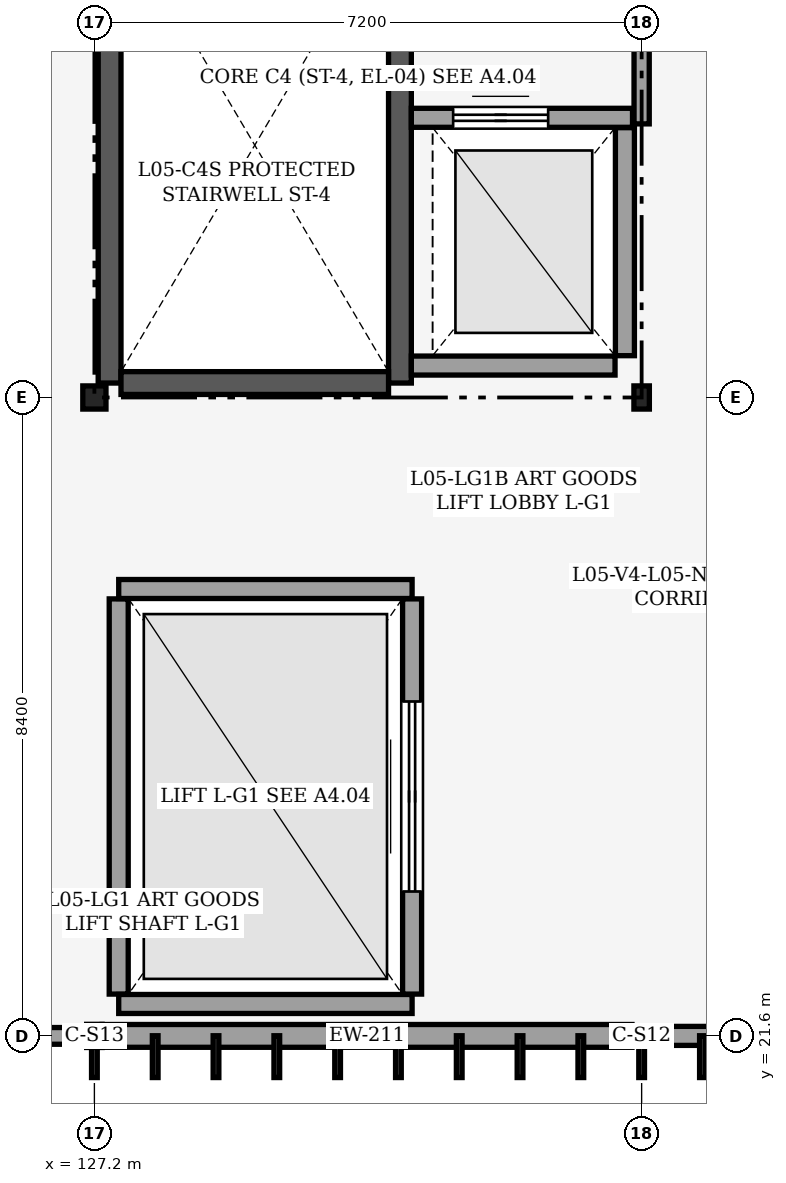
"""IFC4 building model, lengths in metres.
Left out: names, types, materials, properties, quantities, classifications, styles, units other than length and angle.
Written with IfcOpenShell. Run it as: python <this file> out.ifc"""

import sys

from ifc_helpers import new_model, si_unit, direction, frame, frame_2d, origin, origin_2d, place, context, subcontext, project, spatial, rectangle, hollow_rectangle, extrude, element, fill, save


model = new_model("IFC4")
c1 = context("Model", 3, precision=1e-05, world=origin(), true_north=direction((0.0, 1.0)))
c2 = subcontext(c1, "Body", "Model", "MODEL_VIEW")
j1 = project(units=[si_unit("LENGTHUNIT", "METRE"), si_unit("PLANEANGLEUNIT", "RADIAN")], contexts=[c1])
p1 = place(None, origin())
s1 = spatial("IfcSite", under=j1, at=p1, CompositionType="ELEMENT")
p2 = place(p1, origin())
s2 = spatial("IfcBuilding", under=s1, at=p2, CompositionType="ELEMENT")
p3 = place(p2, frame((0.0, 0.0, 24.6)))
s3 = spatial("IfcBuildingStorey", under=s2, at=p3, CompositionType="ELEMENT", Elevation=24.6)
p4 = place(p3, frame((127.2, 21.6, 0.0), z_axis=(0.0, 0.0, 1.0), x_axis=(1.0, 0.0, 0.0)))
e1 = element("IfcColumn", 1, at=p4, inside=s3, PredefinedType="COLUMN", context=c2, shape_type="SweptSolid", body=[
    extrude(hollow_rectangle(XDim=0.203, YDim=0.305, WallThickness=0.013, OuterFilletRadius=0.025, at=origin_2d()), origin(), (0.0, 0.0, 1.0), 4.8),
])
p5 = place(p3, frame((127.2, 30.0, 0.0), z_axis=(0.0, 0.0, 1.0), x_axis=(1.0, 0.0, 0.0)))
e2 = element("IfcColumn", 2, at=p5, inside=s3, PredefinedType="COLUMN", context=c2, shape_type="SweptSolid", body=[
    extrude(hollow_rectangle(XDim=0.305, YDim=0.305, WallThickness=0.016, OuterFilletRadius=0.032, at=origin_2d()), origin(), (0.0, 0.0, 1.0), 4.8),
])
p6 = place(p3, frame((134.4, 21.6, 0.0), z_axis=(0.0, 0.0, 1.0), x_axis=(1.0, 0.0, 0.0)))
e3 = element("IfcColumn", 3, at=p6, inside=s3, PredefinedType="COLUMN", context=c2, shape_type="SweptSolid", body=[
    extrude(hollow_rectangle(XDim=0.254, YDim=0.254, WallThickness=0.013, OuterFilletRadius=0.025, at=origin_2d()), origin(), (0.0, 0.0, 1.0), 4.8),
])
p7 = place(p3, frame((134.4, 30.0, 0.0), z_axis=(0.0, 0.0, 1.0), x_axis=(1.0, 0.0, 0.0)))
e4 = element("IfcColumn", 4, at=p7, inside=s3, PredefinedType="COLUMN", context=c2, shape_type="SweptSolid", body=[
    extrude(hollow_rectangle(XDim=0.203, YDim=0.305, WallThickness=0.013, OuterFilletRadius=0.025, at=origin_2d()), origin(), (0.0, 0.0, 1.0), 4.8),
])
p8 = place(p3, frame((127.098, 21.6, 0.0), z_axis=(0.0, 0.0, 1.0), x_axis=(-1.0, 0.0, 0.0)))
e5 = element("IfcWall", 5, at=p8, inside=s3, PredefinedType="SOLIDWALL", context=c2, shape_type="SweptSolid", body=[
    extrude(rectangle(XDim=6.946, YDim=0.22, at=frame_2d((3.473, 0.0))), origin(), (0.0, 0.0, 1.0), 3.695),
])
p9 = place(p8, frame((2.423, 0.0, 0.9)))
e6 = element("IfcOpeningElement", 6, at=p9, cuts=e5, PredefinedType="OPENING", context=c2, shape_type="SweptSolid", body=[
    extrude(rectangle(XDim=2.1, YDim=0.9, at=frame_2d((1.05, 0.45))), frame((0.0, 0.12, 0.0), z_axis=(0.0, -1.0, 0.0), x_axis=(1.0, 0.0, 0.0)), (0.0, 0.0, 1.0), 0.24),
])
p10 = place(p3, frame((134.273, 21.6, 0.0), z_axis=(0.0, 0.0, 1.0), x_axis=(-1.0, 0.0, 0.0)))
e7 = element("IfcWall", 7, at=p10, inside=s3, PredefinedType="SOLIDWALL", context=c2, shape_type="SweptSolid", body=[
    extrude(rectangle(XDim=6.971, YDim=0.3, at=frame_2d((3.486, 0.0))), origin(), (0.0, 0.0, 1.0), 3.695),
])
p11 = place(p3, frame((141.498, 21.6, 0.0), z_axis=(0.0, 0.0, 1.0), x_axis=(-1.0, 0.0, 0.0)))
e8 = element("IfcWall", 8, at=p11, inside=s3, PredefinedType="SOLIDWALL", context=c2, shape_type="SweptSolid", body=[
    extrude(rectangle(XDim=6.971, YDim=0.25, at=frame_2d((3.486, 0.0))), origin(), (0.0, 0.0, 1.0), 3.695),
])
p12 = place(p11, frame((2.286, 0.0, 0.9)))
e9 = element("IfcOpeningElement", 9, at=p12, cuts=e8, PredefinedType="OPENING", context=c2, shape_type="SweptSolid", body=[
    extrude(rectangle(XDim=2.4, YDim=0.9, at=frame_2d((1.2, 0.45))), frame((0.0, 0.135, 0.0), z_axis=(0.0, -1.0, 0.0), x_axis=(1.0, 0.0, 0.0)), (0.0, 0.0, 1.0), 0.271),
])
p13 = place(p3, frame((127.4, 30.19, 0.0), z_axis=(0.0, 0.0, 1.0), x_axis=(0.0, 1.0, 0.0)))
e10 = element("IfcWall", 10, at=p13, inside=s3, PredefinedType="SHEAR", context=c2, shape_type="SweptSolid", body=[
    extrude(rectangle(XDim=8.02, YDim=0.3, at=frame_2d((4.01, 0.0))), origin(), (0.0, 0.0, 1.0), 4.6),
])
p14 = place(p3, frame((131.22, 30.19, 0.0), z_axis=(0.0, 0.0, 1.0), x_axis=(0.0, 1.0, 0.0)))
e11 = element("IfcWall", 11, at=p14, inside=s3, PredefinedType="SHEAR", context=c2, shape_type="SweptSolid", body=[
    extrude(rectangle(XDim=8.02, YDim=0.3, at=frame_2d((4.01, 0.0))), origin(), (0.0, 0.0, 1.0), 4.6),
])
p15 = place(p14, frame((6.47, 0.0, 0.0)))
e12 = element("IfcOpeningElement", 12, at=p15, cuts=e11, PredefinedType="OPENING", context=c2, shape_type="SweptSolid", body=[
    extrude(rectangle(XDim=1.1, YDim=2.15, at=frame_2d((0.55, 1.075))), frame((0.0, 0.16, 0.0), z_axis=(0.0, -1.0, 0.0), x_axis=(1.0, 0.0, 0.0)), (0.0, 0.0, 1.0), 0.321),
])
p16 = place(p3, frame((127.55, 30.19, 0.0), z_axis=(0.0, 0.0, 1.0), x_axis=(1.0, 0.0, 0.0)))
e13 = element("IfcWall", 13, at=p16, inside=s3, PredefinedType="SHEAR", context=c2, shape_type="SweptSolid", body=[
    extrude(rectangle(XDim=3.52, YDim=0.3, at=frame_2d((1.76, 0.0))), origin(), (0.0, 0.0, 1.0), 4.6),
])
p17 = place(p3, frame((131.37, 30.42, 0.0), z_axis=(0.0, 0.0, 1.0), x_axis=(1.0, 0.0, 0.0)))
e14 = element("IfcWall", 14, at=p17, inside=s3, PredefinedType="PARTITIONING", context=c2, shape_type="SweptSolid", body=[
    extrude(rectangle(XDim=2.68, YDim=0.25, at=frame_2d((1.34, 0.0))), origin(), (0.0, 0.0, 1.0), 4.6),
])
p18 = place(p3, frame((134.18, 30.55, 0.0), z_axis=(0.0, 0.0, 1.0), x_axis=(0.0, 1.0, 0.0)))
e15 = element("IfcWall", 15, at=p18, inside=s3, PredefinedType="PARTITIONING", context=c2, shape_type="SweptSolid", body=[
    extrude(rectangle(XDim=3.0, YDim=0.25, at=frame_2d((1.5, 0.0))), origin(), (0.0, 0.0, 1.0), 4.6),
])
p19 = place(p3, frame((131.37, 33.68, 0.0), z_axis=(0.0, 0.0, 1.0), x_axis=(1.0, 0.0, 0.0)))
e16 = element("IfcWall", 16, at=p19, inside=s3, PredefinedType="PARTITIONING", context=c2, shape_type="SweptSolid", body=[
    extrude(rectangle(XDim=2.91, YDim=0.25, at=frame_2d((1.455, 0.0))), origin(), (0.0, 0.0, 1.0), 4.6),
])
p20 = place(p19, frame((0.55, 0.0, 0.0)))
e17 = element("IfcOpeningElement", 17, at=p20, cuts=e16, PredefinedType="OPENING", context=c2, shape_type="SweptSolid", body=[
    extrude(rectangle(XDim=1.25, YDim=2.15, at=frame_2d((0.625, 1.075))), frame((0.0, 0.135, 0.0), z_axis=(0.0, -1.0, 0.0), x_axis=(1.0, 0.0, 0.0)), (0.0, 0.0, 1.0), 0.271),
])
p21 = place(p3, frame((134.4, 33.6, 0.0), z_axis=(0.0, 0.0, 1.0), x_axis=(0.0, 1.0, 0.0)))
e18 = element("IfcWall", 18, at=p21, inside=s3, PredefinedType="PARTITIONING", context=c2, shape_type="SweptSolid", body=[
    extrude(rectangle(XDim=4.58, YDim=0.2, at=frame_2d((2.29, 0.0))), origin(), (0.0, 0.0, 1.0), 4.6),
])
p22 = place(p3, frame((127.52, 22.15, 0.0), z_axis=(0.0, 0.0, 1.0), x_axis=(0.0, 1.0, 0.0)))
e19 = element("IfcWall", 19, at=p22, inside=s3, PredefinedType="PARTITIONING", context=c2, shape_type="SweptSolid", body=[
    extrude(rectangle(XDim=5.2, YDim=0.25, at=frame_2d((2.6, 0.0))), origin(), (0.0, 0.0, 1.0), 4.6),
])
for number, where, z_axis, x_axis in (
    (20, (127.52, 27.48, 0.0), (0.0, 0.0, 1.0), (1.0, 0.0, 0.0)),
    (21, (127.52, 22.02, 0.0), (0.0, 0.0, 1.0), (1.0, 0.0, 0.0)),
):
    element("IfcWall", number, at=place(p3, frame(where, z_axis=z_axis, x_axis=x_axis)), inside=s3, PredefinedType="PARTITIONING", context=c2, shape_type="SweptSolid", body=[
        extrude(rectangle(XDim=3.86, YDim=0.25, at=frame_2d((1.93, 0.0))), origin(), (0.0, 0.0, 1.0), 4.6),
    ])
p23 = place(p3, frame((131.38, 22.15, 0.0), z_axis=(0.0, 0.0, 1.0), x_axis=(0.0, 1.0, 0.0)))
e22 = element("IfcWall", 22, at=p23, inside=s3, PredefinedType="PARTITIONING", context=c2, shape_type="SweptSolid", body=[
    extrude(rectangle(XDim=5.2, YDim=0.25, at=frame_2d((2.6, 0.0))), origin(), (0.0, 0.0, 1.0), 4.6),
])
p24 = place(p23, frame((1.35, 0.0, 0.0)))
e23 = element("IfcOpeningElement", 23, at=p24, cuts=e22, PredefinedType="OPENING", context=c2, shape_type="SweptSolid", body=[
    extrude(rectangle(XDim=2.5, YDim=2.6, at=frame_2d((1.25, 1.3))), frame((0.0, 0.135, 0.0), z_axis=(0.0, -1.0, 0.0), x_axis=(1.0, 0.0, 0.0)), (0.0, 0.0, 1.0), 0.271),
])
p25 = place(p20, origin())
e24 = element("IfcDoor", 24, at=p25, inside=s3, OperationType="DOUBLE_DOOR_SLIDING", PredefinedType="DOOR", context=c2, shape_type="SweptSolid", body=[
    extrude(rectangle(XDim=1.25, YDim=2.15, at=frame_2d((0.625, 1.075))), frame((0.0, 0.025, 0.0), z_axis=(0.0, -1.0, 0.0), x_axis=(1.0, 0.0, 0.0)), (0.0, 0.0, 1.0), 0.05),
])
fill(e17, e24)
p26 = place(p24, origin())
e25 = element("IfcDoor", 25, at=p26, inside=s3, OperationType="DOUBLE_DOOR_SLIDING", PredefinedType="DOOR", context=c2, shape_type="SweptSolid", body=[
    extrude(rectangle(XDim=2.5, YDim=2.6, at=frame_2d((1.25, 1.3))), frame((0.0, 0.025, 0.0), z_axis=(0.0, -1.0, 0.0), x_axis=(1.0, 0.0, 0.0)), (0.0, 0.0, 1.0), 0.05),
])
fill(e23, e25)
save(model, sys.argv[1])
